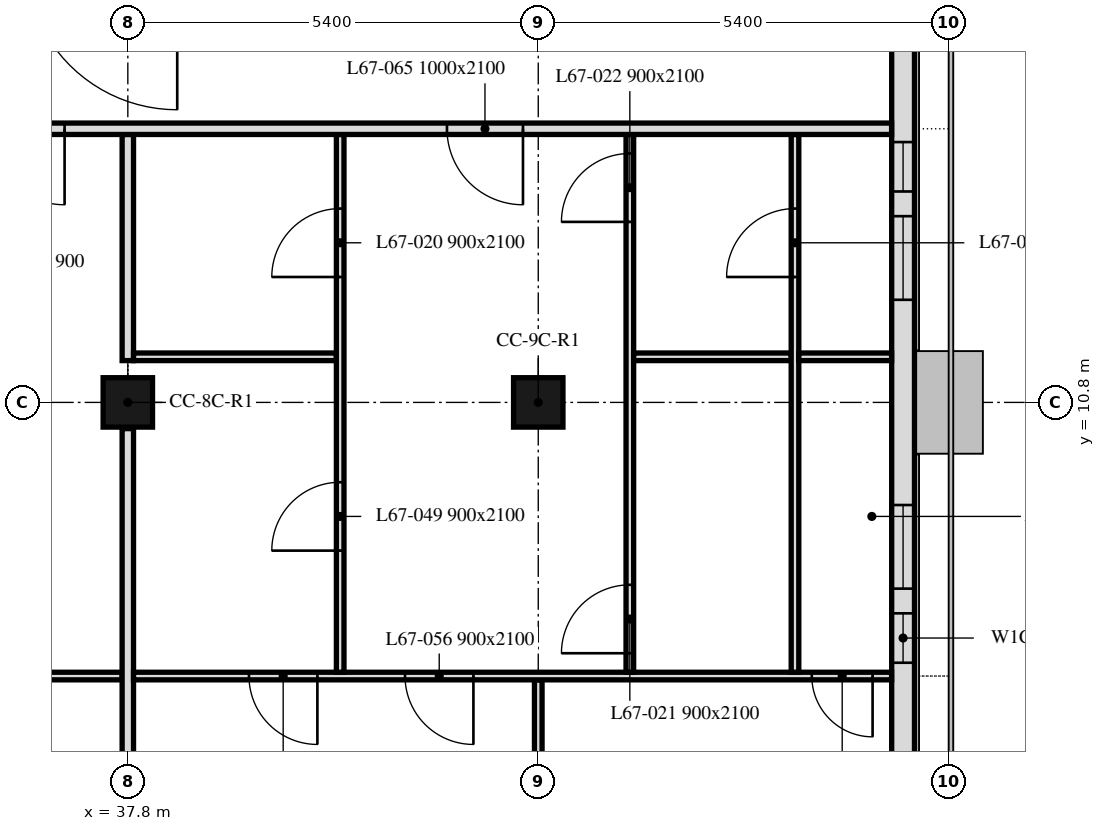
"""IFC4 building model, lengths in metres.
Left out: names, types, materials, properties, quantities, classifications, styles, units other than length and angle.
Written with IfcOpenShell. Run it as: python <this file> out.ifc"""

import sys

from ifc_helpers import new_model, si_unit, direction, frame, frame_2d, origin, origin_2d, place, context, subcontext, project, spatial, rectangle, extrude, element, fill, save


model = new_model("IFC4")
c1 = context("Model", 3, precision=1e-05, world=origin(), true_north=direction((0.0, 1.0)))
c2 = subcontext(c1, "Body", "Model", "MODEL_VIEW")
j1 = project(units=[si_unit("LENGTHUNIT", "METRE"), si_unit("PLANEANGLEUNIT", "RADIAN")], contexts=[c1])
p1 = place(None, origin())
s1 = spatial("IfcSite", under=j1, at=p1, CompositionType="ELEMENT")
p2 = place(p1, origin())
s2 = spatial("IfcBuilding", under=s1, at=p2, CompositionType="ELEMENT")
p3 = place(p2, frame((0.0, 0.0, 275.2)))
s3 = spatial("IfcBuildingStorey", under=s2, at=p3, CompositionType="ELEMENT", Elevation=275.2)
for number, where, z_axis, x_axis in (
    (1, (37.8, 10.8, 0.0), (0.0, 0.0, 1.0), (1.0, 0.0, 0.0)),
    (2, (43.2, 10.8, 0.0), (0.0, 0.0, 1.0), (1.0, 0.0, 0.0)),
):
    element("IfcColumn", number, at=place(p3, frame(where, z_axis=z_axis, x_axis=x_axis)), inside=s3, PredefinedType="COLUMN", context=c2, shape_type="SweptSolid", body=[
        extrude(rectangle(XDim=0.65, YDim=0.65, at=origin_2d()), origin(), (0.0, 0.0, 1.0), 3.0),
    ])
p4 = place(p3, frame((48.0, 5.586, 0.0), z_axis=(0.0, 0.0, 1.0), x_axis=(0.0, 1.0, 0.0)))
e3 = element("IfcWall", 3, at=p4, inside=s3, PredefinedType="SOLIDWALL", context=c2, shape_type="SweptSolid", body=[
    extrude(rectangle(XDim=32.027, YDim=0.3, at=frame_2d((16.014, 0.0))), origin(), (0.0, 0.0, 1.0), 3.0),
])
p5 = place(p4, frame((1.789, 0.0, 0.9)))
e4 = element("IfcOpeningElement", 4, at=p5, cuts=e3, PredefinedType="OPENING", context=c2, shape_type="SweptSolid", body=[
    extrude(rectangle(XDim=0.65, YDim=1.7, at=frame_2d((0.325, 0.85))), frame((0.0, 0.16, 0.0), z_axis=(0.0, -1.0, 0.0), x_axis=(1.0, 0.0, 0.0)), (0.0, 0.0, 1.0), 0.32),
])
p6 = place(p4, frame((2.764, 0.0, 0.9)))
e5 = element("IfcOpeningElement", 5, at=p6, cuts=e3, PredefinedType="OPENING", context=c2, shape_type="SweptSolid", body=[
    extrude(rectangle(XDim=1.1, YDim=1.7, at=frame_2d((0.55, 0.85))), frame((0.0, 0.16, 0.0), z_axis=(0.0, -1.0, 0.0), x_axis=(1.0, 0.0, 0.0)), (0.0, 0.0, 1.0), 0.32),
])
p7 = place(p4, frame((6.564, 0.0, 0.9)))
e6 = element("IfcOpeningElement", 6, at=p7, cuts=e3, PredefinedType="OPENING", context=c2, shape_type="SweptSolid", body=[
    extrude(rectangle(XDim=1.1, YDim=1.7, at=frame_2d((0.55, 0.85))), frame((0.0, 0.16, 0.0), z_axis=(0.0, -1.0, 0.0), x_axis=(1.0, 0.0, 0.0)), (0.0, 0.0, 1.0), 0.32),
])
p8 = place(p4, frame((7.989, 0.0, 0.9)))
e7 = element("IfcOpeningElement", 7, at=p8, cuts=e3, PredefinedType="OPENING", context=c2, shape_type="SweptSolid", body=[
    extrude(rectangle(XDim=0.65, YDim=1.7, at=frame_2d((0.325, 0.85))), frame((0.0, 0.16, 0.0), z_axis=(0.0, -1.0, 0.0), x_axis=(1.0, 0.0, 0.0)), (0.0, 0.0, 1.0), 0.32),
])
p9 = place(p4, frame((11.964, 0.0, 0.9)))
e8 = element("IfcOpeningElement", 8, at=p9, cuts=e3, PredefinedType="OPENING", context=c2, shape_type="SweptSolid", body=[
    extrude(rectangle(XDim=1.1, YDim=1.7, at=frame_2d((0.55, 0.85))), frame((0.0, 0.16, 0.0), z_axis=(0.0, -1.0, 0.0), x_axis=(1.0, 0.0, 0.0)), (0.0, 0.0, 1.0), 0.32),
])
p10 = place(p4, frame((13.564, 0.0, 0.9)))
e9 = element("IfcOpeningElement", 9, at=p10, cuts=e3, PredefinedType="OPENING", context=c2, shape_type="SweptSolid", body=[
    extrude(rectangle(XDim=1.1, YDim=1.7, at=frame_2d((0.55, 0.85))), frame((0.0, 0.16, 0.0), z_axis=(0.0, -1.0, 0.0), x_axis=(1.0, 0.0, 0.0)), (0.0, 0.0, 1.0), 0.32),
])
p11 = place(p4, frame((17.014, 0.0, 0.9)))
e10 = element("IfcOpeningElement", 10, at=p11, cuts=e3, PredefinedType="OPENING", context=c2, shape_type="SweptSolid", body=[
    extrude(rectangle(XDim=3.4, YDim=1.7, at=frame_2d((1.7, 0.85))), frame((0.0, 0.16, 0.0), z_axis=(0.0, -1.0, 0.0), x_axis=(1.0, 0.0, 0.0)), (0.0, 0.0, 1.0), 0.32),
])
p12 = place(p4, frame((22.764, 0.0, 0.9)))
e11 = element("IfcOpeningElement", 11, at=p12, cuts=e3, PredefinedType="OPENING", context=c2, shape_type="SweptSolid", body=[
    extrude(rectangle(XDim=1.1, YDim=1.7, at=frame_2d((0.55, 0.85))), frame((0.0, 0.16, 0.0), z_axis=(0.0, -1.0, 0.0), x_axis=(1.0, 0.0, 0.0)), (0.0, 0.0, 1.0), 0.32),
])
p13 = place(p4, frame((24.364, 0.0, 0.9)))
e12 = element("IfcOpeningElement", 12, at=p13, cuts=e3, PredefinedType="OPENING", context=c2, shape_type="SweptSolid", body=[
    extrude(rectangle(XDim=1.1, YDim=1.7, at=frame_2d((0.55, 0.85))), frame((0.0, 0.16, 0.0), z_axis=(0.0, -1.0, 0.0), x_axis=(1.0, 0.0, 0.0)), (0.0, 0.0, 1.0), 0.32),
])
p14 = place(p4, frame((28.789, 0.0, 0.9)))
e13 = element("IfcOpeningElement", 13, at=p14, cuts=e3, PredefinedType="OPENING", context=c2, shape_type="SweptSolid", body=[
    extrude(rectangle(XDim=0.65, YDim=1.7, at=frame_2d((0.325, 0.85))), frame((0.0, 0.16, 0.0), z_axis=(0.0, -1.0, 0.0), x_axis=(1.0, 0.0, 0.0)), (0.0, 0.0, 1.0), 0.32),
])
p15 = place(p4, frame((29.764, 0.0, 0.9)))
e14 = element("IfcOpeningElement", 14, at=p15, cuts=e3, PredefinedType="OPENING", context=c2, shape_type="SweptSolid", body=[
    extrude(rectangle(XDim=1.1, YDim=1.7, at=frame_2d((0.55, 0.85))), frame((0.0, 0.16, 0.0), z_axis=(0.0, -1.0, 0.0), x_axis=(1.0, 0.0, 0.0)), (0.0, 0.0, 1.0), 0.32),
])
p16 = place(p3, frame((37.725, 7.2, 0.0), z_axis=(0.0, 0.0, 1.0), x_axis=(-1.0, 0.0, 0.0)))
e15 = element("IfcWall", 15, at=p16, inside=s3, PredefinedType="PARTITIONING", context=c2, shape_type="SweptSolid", body=[
    extrude(rectangle(XDim=5.25, YDim=0.1, at=frame_2d((2.625, 0.0))), origin(), (0.0, 0.0, 1.0), 3.0),
])
p17 = place(p16, frame((2.89, 0.0, 0.0)))
e16 = element("IfcOpeningElement", 16, at=p17, cuts=e15, PredefinedType="OPENING", context=c2, shape_type="SweptSolid", body=[
    extrude(rectangle(XDim=0.9, YDim=2.1, at=frame_2d((0.45, 1.05))), frame((0.0, 0.05, 0.0), z_axis=(0.0, -1.0, 0.0), x_axis=(1.0, 0.0, 0.0)), (0.0, 0.0, 1.0), 0.1),
])
p18 = place(p16, frame((1.39, 0.0, 0.0)))
e17 = element("IfcOpeningElement", 17, at=p18, cuts=e15, PredefinedType="OPENING", context=c2, shape_type="SweptSolid", body=[
    extrude(rectangle(XDim=0.9, YDim=2.1, at=frame_2d((0.45, 1.05))), frame((0.0, 0.05, 0.0), z_axis=(0.0, -1.0, 0.0), x_axis=(1.0, 0.0, 0.0)), (0.0, 0.0, 1.0), 0.1),
])
p19 = place(p3, frame((37.8, 5.745, 0.0), z_axis=(0.0, 0.0, 1.0), x_axis=(0.0, 1.0, 0.0)))
e18 = element("IfcWall", 18, at=p19, inside=s3, PredefinedType="PARTITIONING", context=c2, shape_type="SweptSolid", body=[
    extrude(rectangle(XDim=4.71, YDim=0.15, at=frame_2d((2.355, 0.0))), origin(), (0.0, 0.0, 1.0), 2.4),
])
p20 = place(p3, frame((37.8, 11.35, 0.0), z_axis=(0.0, 0.0, 1.0), x_axis=(0.0, 1.0, 0.0)))
e19 = element("IfcWall", 19, at=p20, inside=s3, PredefinedType="PARTITIONING", context=c2, shape_type="SweptSolid", body=[
    extrude(rectangle(XDim=2.975, YDim=0.15, at=frame_2d((1.487, 0.0))), origin(), (0.0, 0.0, 1.0), 2.4),
])
p21 = place(p3, frame((43.2, 1.112, 0.0), z_axis=(0.0, 0.0, 1.0), x_axis=(0.0, 1.0, 0.0)))
e20 = element("IfcWall", 20, at=p21, inside=s3, PredefinedType="PARTITIONING", context=c2, shape_type="SweptSolid", body=[
    extrude(rectangle(XDim=6.038, YDim=0.1, at=frame_2d((3.019, 0.0))), origin(), (0.0, 0.0, 1.0), 3.0),
])
p22 = place(p21, frame((2.038, 0.0, 0.0)))
e21 = element("IfcOpeningElement", 21, at=p22, cuts=e20, PredefinedType="OPENING", context=c2, shape_type="SweptSolid", body=[
    extrude(rectangle(XDim=0.9, YDim=2.1, at=frame_2d((0.45, 1.05))), frame((0.0, 0.05, 0.0), z_axis=(0.0, -1.0, 0.0), x_axis=(1.0, 0.0, 0.0)), (0.0, 0.0, 1.0), 0.1),
])
p23 = place(p3, frame((47.849, 7.2, 0.0), z_axis=(0.0, 0.0, 1.0), x_axis=(-1.0, 0.0, 0.0)))
e22 = element("IfcWall", 22, at=p23, inside=s3, PredefinedType="PARTITIONING", context=c2, shape_type="SweptSolid", body=[
    extrude(rectangle(XDim=9.974, YDim=0.1, at=frame_2d((4.987, 0.0))), origin(), (0.0, 0.0, 1.0), 3.0),
])
p24 = place(p23, frame((7.555, 0.0, 0.0)))
e23 = element("IfcOpeningElement", 23, at=p24, cuts=e22, PredefinedType="OPENING", context=c2, shape_type="SweptSolid", body=[
    extrude(rectangle(XDim=0.9, YDim=2.1, at=frame_2d((0.45, 1.05))), frame((0.0, 0.05, 0.0), z_axis=(0.0, -1.0, 0.0), x_axis=(1.0, 0.0, 0.0)), (0.0, 0.0, 1.0), 0.1),
])
p25 = place(p23, frame((5.502, 0.0, 0.0)))
e24 = element("IfcOpeningElement", 24, at=p25, cuts=e22, PredefinedType="OPENING", context=c2, shape_type="SweptSolid", body=[
    extrude(rectangle(XDim=0.9, YDim=2.1, at=frame_2d((0.45, 1.05))), frame((0.0, 0.05, 0.0), z_axis=(0.0, -1.0, 0.0), x_axis=(1.0, 0.0, 0.0)), (0.0, 0.0, 1.0), 0.1),
])
p26 = place(p23, frame((0.25, 0.0, 0.0)))
e25 = element("IfcOpeningElement", 25, at=p26, cuts=e22, PredefinedType="OPENING", context=c2, shape_type="SweptSolid", body=[
    extrude(rectangle(XDim=0.8, YDim=2.1, at=frame_2d((0.4, 1.05))), frame((0.0, 0.05, 0.0), z_axis=(0.0, -1.0, 0.0), x_axis=(1.0, 0.0, 0.0)), (0.0, 0.0, 1.0), 0.1),
])
p27 = place(p3, frame((40.544, 11.4, 0.0), z_axis=(0.0, 0.0, 1.0), x_axis=(-1.0, 0.0, 0.0)))
e26 = element("IfcWall", 26, at=p27, inside=s3, PredefinedType="PARTITIONING", context=c2, shape_type="SweptSolid", body=[
    extrude(rectangle(XDim=2.669, YDim=0.1, at=frame_2d((1.334, 0.0))), origin(), (0.0, 0.0, 1.0), 3.0),
])
p28 = place(p3, frame((40.594, 7.25, 0.0), z_axis=(0.0, 0.0, 1.0), x_axis=(0.0, 1.0, 0.0)))
e27 = element("IfcWall", 27, at=p28, inside=s3, PredefinedType="PARTITIONING", context=c2, shape_type="SweptSolid", body=[
    extrude(rectangle(XDim=7.075, YDim=0.1, at=frame_2d((3.538, 0.0))), origin(), (0.0, 0.0, 1.0), 2.4),
])
p29 = place(p28, frame((5.2, 0.0, 0.0)))
e28 = element("IfcOpeningElement", 28, at=p29, cuts=e27, PredefinedType="OPENING", context=c2, shape_type="SweptSolid", body=[
    extrude(rectangle(XDim=0.9, YDim=2.1, at=frame_2d((0.45, 1.05))), frame((0.0, 0.05, 0.0), z_axis=(0.0, -1.0, 0.0), x_axis=(1.0, 0.0, 0.0)), (0.0, 0.0, 1.0), 0.1),
])
p30 = place(p28, frame((1.6, 0.0, 0.0)))
e29 = element("IfcOpeningElement", 29, at=p30, cuts=e27, PredefinedType="OPENING", context=c2, shape_type="SweptSolid", body=[
    extrude(rectangle(XDim=0.9, YDim=2.1, at=frame_2d((0.45, 1.05))), frame((0.0, 0.05, 0.0), z_axis=(0.0, -1.0, 0.0), x_axis=(1.0, 0.0, 0.0)), (0.0, 0.0, 1.0), 0.1),
])
p31 = place(p3, frame((44.405, 7.25, 0.0), z_axis=(0.0, 0.0, 1.0), x_axis=(0.0, 1.0, 0.0)))
e30 = element("IfcWall", 30, at=p31, inside=s3, PredefinedType="PARTITIONING", context=c2, shape_type="SweptSolid", body=[
    extrude(rectangle(XDim=7.075, YDim=0.1, at=frame_2d((3.538, 0.0))), origin(), (0.0, 0.0, 1.0), 2.4),
])
p32 = place(p31, frame((0.25, 0.0, 0.0)))
e31 = element("IfcOpeningElement", 31, at=p32, cuts=e30, PredefinedType="OPENING", context=c2, shape_type="SweptSolid", body=[
    extrude(rectangle(XDim=0.9, YDim=2.1, at=frame_2d((0.45, 1.05))), frame((0.0, 0.05, 0.0), z_axis=(0.0, -1.0, 0.0), x_axis=(1.0, 0.0, 0.0)), (0.0, 0.0, 1.0), 0.1),
])
p33 = place(p31, frame((5.925, 0.0, 0.0)))
e32 = element("IfcOpeningElement", 32, at=p33, cuts=e30, PredefinedType="OPENING", context=c2, shape_type="SweptSolid", body=[
    extrude(rectangle(XDim=0.9, YDim=2.1, at=frame_2d((0.45, 1.05))), frame((0.0, 0.05, 0.0), z_axis=(0.0, -1.0, 0.0), x_axis=(1.0, 0.0, 0.0)), (0.0, 0.0, 1.0), 0.1),
])
p34 = place(p3, frame((46.528, 11.4, 0.0), z_axis=(0.0, 0.0, 1.0), x_axis=(-1.0, 0.0, 0.0)))
e33 = element("IfcWall", 33, at=p34, inside=s3, PredefinedType="PARTITIONING", context=c2, shape_type="SweptSolid", body=[
    extrude(rectangle(XDim=2.073, YDim=0.1, at=frame_2d((1.037, 0.0))), origin(), (0.0, 0.0, 1.0), 3.0),
])
p35 = place(p3, frame((46.578, 7.25, 0.0), z_axis=(0.0, 0.0, 1.0), x_axis=(0.0, 1.0, 0.0)))
e34 = element("IfcWall", 34, at=p35, inside=s3, PredefinedType="PARTITIONING", context=c2, shape_type="SweptSolid", body=[
    extrude(rectangle(XDim=7.075, YDim=0.1, at=frame_2d((3.538, 0.0))), origin(), (0.0, 0.0, 1.0), 2.4),
])
p36 = place(p35, frame((5.2, 0.0, 0.0)))
e35 = element("IfcOpeningElement", 35, at=p36, cuts=e34, PredefinedType="OPENING", context=c2, shape_type="SweptSolid", body=[
    extrude(rectangle(XDim=0.9, YDim=2.1, at=frame_2d((0.45, 1.05))), frame((0.0, 0.05, 0.0), z_axis=(0.0, -1.0, 0.0), x_axis=(1.0, 0.0, 0.0)), (0.0, 0.0, 1.0), 0.1),
])
p37 = place(p3, frame((47.849, 11.4, 0.0), z_axis=(0.0, 0.0, 1.0), x_axis=(-1.0, 0.0, 0.0)))
e36 = element("IfcWall", 36, at=p37, inside=s3, PredefinedType="PARTITIONING", context=c2, shape_type="SweptSolid", body=[
    extrude(rectangle(XDim=1.221, YDim=0.1, at=frame_2d((0.611, 0.0))), origin(), (0.0, 0.0, 1.0), 3.0),
])
p38 = place(p3, frame((47.849, 14.4, 0.0), z_axis=(0.0, 0.0, 1.0), x_axis=(-1.0, 0.0, 0.0)))
e37 = element("IfcWall", 37, at=p38, inside=s3, PredefinedType="PARTITIONING", context=c2, shape_type="SweptSolid", body=[
    extrude(rectangle(XDim=41.698, YDim=0.15, at=frame_2d((20.849, 0.0))), origin(), (0.0, 0.0, 1.0), 2.4),
])
p39 = place(p38, frame((10.881, 0.0, 0.0)))
e38 = element("IfcOpeningElement", 38, at=p39, cuts=e37, PredefinedType="OPENING", context=c2, shape_type="SweptSolid", body=[
    extrude(rectangle(XDim=1.0, YDim=2.1, at=frame_2d((0.5, 1.05))), frame((0.0, 0.075, 0.0), z_axis=(0.0, -1.0, 0.0), x_axis=(1.0, 0.0, 0.0)), (0.0, 0.0, 1.0), 0.15),
])
p40 = place(p38, frame((37.759, 0.0, 0.0)))
e39 = element("IfcOpeningElement", 39, at=p40, cuts=e37, PredefinedType="OPENING", context=c2, shape_type="SweptSolid", body=[
    extrude(rectangle(XDim=1.0, YDim=2.1, at=frame_2d((0.5, 1.05))), frame((0.0, 0.075, 0.0), z_axis=(0.0, -1.0, 0.0), x_axis=(1.0, 0.0, 0.0)), (0.0, 0.0, 1.0), 0.15),
])
p41 = place(p38, frame((22.815, 0.0, 0.0)))
e40 = element("IfcOpeningElement", 40, at=p41, cuts=e37, PredefinedType="OPENING", context=c2, shape_type="SweptSolid", body=[
    extrude(rectangle(XDim=1.0, YDim=2.1, at=frame_2d((0.5, 1.05))), frame((0.0, 0.075, 0.0), z_axis=(0.0, -1.0, 0.0), x_axis=(1.0, 0.0, 0.0)), (0.0, 0.0, 1.0), 0.15),
])
p42 = place(p38, frame((4.85, 0.0, 0.0)))
e41 = element("IfcOpeningElement", 41, at=p42, cuts=e37, PredefinedType="OPENING", context=c2, shape_type="SweptSolid", body=[
    extrude(rectangle(XDim=1.0, YDim=2.1, at=frame_2d((0.5, 1.05))), frame((0.0, 0.075, 0.0), z_axis=(0.0, -1.0, 0.0), x_axis=(1.0, 0.0, 0.0)), (0.0, 0.0, 1.0), 0.15),
])
p43 = place(p5, origin())
e42 = element("IfcWindow", 42, at=p43, inside=s3, PartitioningType="SINGLE_PANEL", PredefinedType="WINDOW", context=c2, shape_type="SweptSolid", body=[
    extrude(rectangle(XDim=0.65, YDim=1.7, at=frame_2d((0.325, 0.85))), frame((0.0, 0.03, 0.0), z_axis=(0.0, -1.0, 0.0), x_axis=(1.0, 0.0, 0.0)), (0.0, 0.0, 1.0), 0.06),
])
fill(e4, e42)
p44 = place(p6, origin())
e43 = element("IfcWindow", 43, at=p44, inside=s3, PartitioningType="SINGLE_PANEL", PredefinedType="WINDOW", context=c2, shape_type="SweptSolid", body=[
    extrude(rectangle(XDim=1.1, YDim=1.7, at=frame_2d((0.55, 0.85))), frame((0.0, 0.03, 0.0), z_axis=(0.0, -1.0, 0.0), x_axis=(1.0, 0.0, 0.0)), (0.0, 0.0, 1.0), 0.06),
])
fill(e5, e43)
p45 = place(p7, origin())
e44 = element("IfcWindow", 44, at=p45, inside=s3, PartitioningType="SINGLE_PANEL", PredefinedType="WINDOW", context=c2, shape_type="SweptSolid", body=[
    extrude(rectangle(XDim=1.1, YDim=1.7, at=frame_2d((0.55, 0.85))), frame((0.0, 0.03, 0.0), z_axis=(0.0, -1.0, 0.0), x_axis=(1.0, 0.0, 0.0)), (0.0, 0.0, 1.0), 0.06),
])
fill(e6, e44)
p46 = place(p8, origin())
e45 = element("IfcWindow", 45, at=p46, inside=s3, PartitioningType="SINGLE_PANEL", PredefinedType="WINDOW", context=c2, shape_type="SweptSolid", body=[
    extrude(rectangle(XDim=0.65, YDim=1.7, at=frame_2d((0.325, 0.85))), frame((0.0, 0.03, 0.0), z_axis=(0.0, -1.0, 0.0), x_axis=(1.0, 0.0, 0.0)), (0.0, 0.0, 1.0), 0.06),
])
fill(e7, e45)
p47 = place(p29, origin())
e46 = element("IfcDoor", 46, at=p47, inside=s3, OperationType="SINGLE_SWING_LEFT", PredefinedType="DOOR", context=c2, shape_type="SweptSolid", body=[
    extrude(rectangle(XDim=0.9, YDim=2.1, at=frame_2d((0.45, 1.05))), frame((0.0, 0.025, 0.0), z_axis=(0.0, -1.0, 0.0), x_axis=(1.0, 0.0, 0.0)), (0.0, 0.0, 1.0), 0.05),
])
fill(e28, e46)
p48 = place(p32, origin())
e47 = element("IfcDoor", 47, at=p48, inside=s3, OperationType="SINGLE_SWING_RIGHT", PredefinedType="DOOR", context=c2, shape_type="SweptSolid", body=[
    extrude(rectangle(XDim=0.9, YDim=2.1, at=frame_2d((0.45, 1.05))), frame((0.0, 0.025, 0.0), z_axis=(0.0, -1.0, 0.0), x_axis=(1.0, 0.0, 0.0)), (0.0, 0.0, 1.0), 0.05),
])
fill(e31, e47)
p49 = place(p33, origin())
e48 = element("IfcDoor", 48, at=p49, inside=s3, OperationType="SINGLE_SWING_RIGHT", PredefinedType="DOOR", context=c2, shape_type="SweptSolid", body=[
    extrude(rectangle(XDim=0.9, YDim=2.1, at=frame_2d((0.45, 1.05))), frame((0.0, 0.025, 0.0), z_axis=(0.0, -1.0, 0.0), x_axis=(1.0, 0.0, 0.0)), (0.0, 0.0, 1.0), 0.05),
])
fill(e32, e48)
p50 = place(p24, origin())
e49 = element("IfcDoor", 49, at=p50, inside=s3, OperationType="SINGLE_SWING_RIGHT", PredefinedType="DOOR", context=c2, shape_type="SweptSolid", body=[
    extrude(rectangle(XDim=0.9, YDim=2.1, at=frame_2d((0.45, 1.05))), frame((0.0, 0.025, 0.0), z_axis=(0.0, -1.0, 0.0), x_axis=(1.0, 0.0, 0.0)), (0.0, 0.0, 1.0), 0.05),
])
fill(e23, e49)
p51 = place(p30, origin())
e50 = element("IfcDoor", 50, at=p51, inside=s3, OperationType="SINGLE_SWING_RIGHT", PredefinedType="DOOR", context=c2, shape_type="SweptSolid", body=[
    extrude(rectangle(XDim=0.9, YDim=2.1, at=frame_2d((0.45, 1.05))), frame((0.0, 0.025, 0.0), z_axis=(0.0, -1.0, 0.0), x_axis=(1.0, 0.0, 0.0)), (0.0, 0.0, 1.0), 0.05),
])
fill(e29, e50)
p52 = place(p25, origin())
e51 = element("IfcDoor", 51, at=p52, inside=s3, OperationType="SINGLE_SWING_LEFT", PredefinedType="DOOR", context=c2, shape_type="SweptSolid", body=[
    extrude(rectangle(XDim=0.9, YDim=2.1, at=frame_2d((0.45, 1.05))), frame((0.0, 0.025, 0.0), z_axis=(0.0, -1.0, 0.0), x_axis=(1.0, 0.0, 0.0)), (0.0, 0.0, 1.0), 0.05),
])
fill(e24, e51)
p53 = place(p39, origin())
e52 = element("IfcDoor", 52, at=p53, inside=s3, OperationType="SINGLE_SWING_RIGHT", PredefinedType="DOOR", context=c2, shape_type="SweptSolid", body=[
    extrude(rectangle(XDim=1.0, YDim=2.1, at=frame_2d((0.5, 1.05))), frame((0.0, 0.025, 0.0), z_axis=(0.0, -1.0, 0.0), x_axis=(1.0, 0.0, 0.0)), (0.0, 0.0, 1.0), 0.05),
])
fill(e38, e52)
p54 = place(p42, origin())
e53 = element("IfcDoor", 53, at=p54, inside=s3, OperationType="SINGLE_SWING_RIGHT", PredefinedType="DOOR", context=c2, shape_type="SweptSolid", body=[
    extrude(rectangle(XDim=1.0, YDim=2.1, at=frame_2d((0.5, 1.05))), frame((0.0, 0.025, 0.0), z_axis=(0.0, -1.0, 0.0), x_axis=(1.0, 0.0, 0.0)), (0.0, 0.0, 1.0), 0.05),
])
fill(e41, e53)
p55 = place(p26, origin())
e54 = element("IfcDoor", 54, at=p55, inside=s3, OperationType="SINGLE_SWING_LEFT", PredefinedType="DOOR", context=c2, shape_type="SweptSolid", body=[
    extrude(rectangle(XDim=0.8, YDim=2.1, at=frame_2d((0.4, 1.05))), frame((0.0, 0.025, 0.0), z_axis=(0.0, -1.0, 0.0), x_axis=(1.0, 0.0, 0.0)), (0.0, 0.0, 1.0), 0.05),
])
fill(e25, e54)
p56 = place(p36, origin())
e55 = element("IfcDoor", 55, at=p56, inside=s3, OperationType="SINGLE_SWING_RIGHT", PredefinedType="DOOR", context=c2, shape_type="SweptSolid", body=[
    extrude(rectangle(XDim=0.9, YDim=2.1, at=frame_2d((0.45, 1.05))), frame((0.0, 0.025, 0.0), z_axis=(0.0, -1.0, 0.0), x_axis=(1.0, 0.0, 0.0)), (0.0, 0.0, 1.0), 0.05),
])
fill(e35, e55)
save(model, sys.argv[1])
